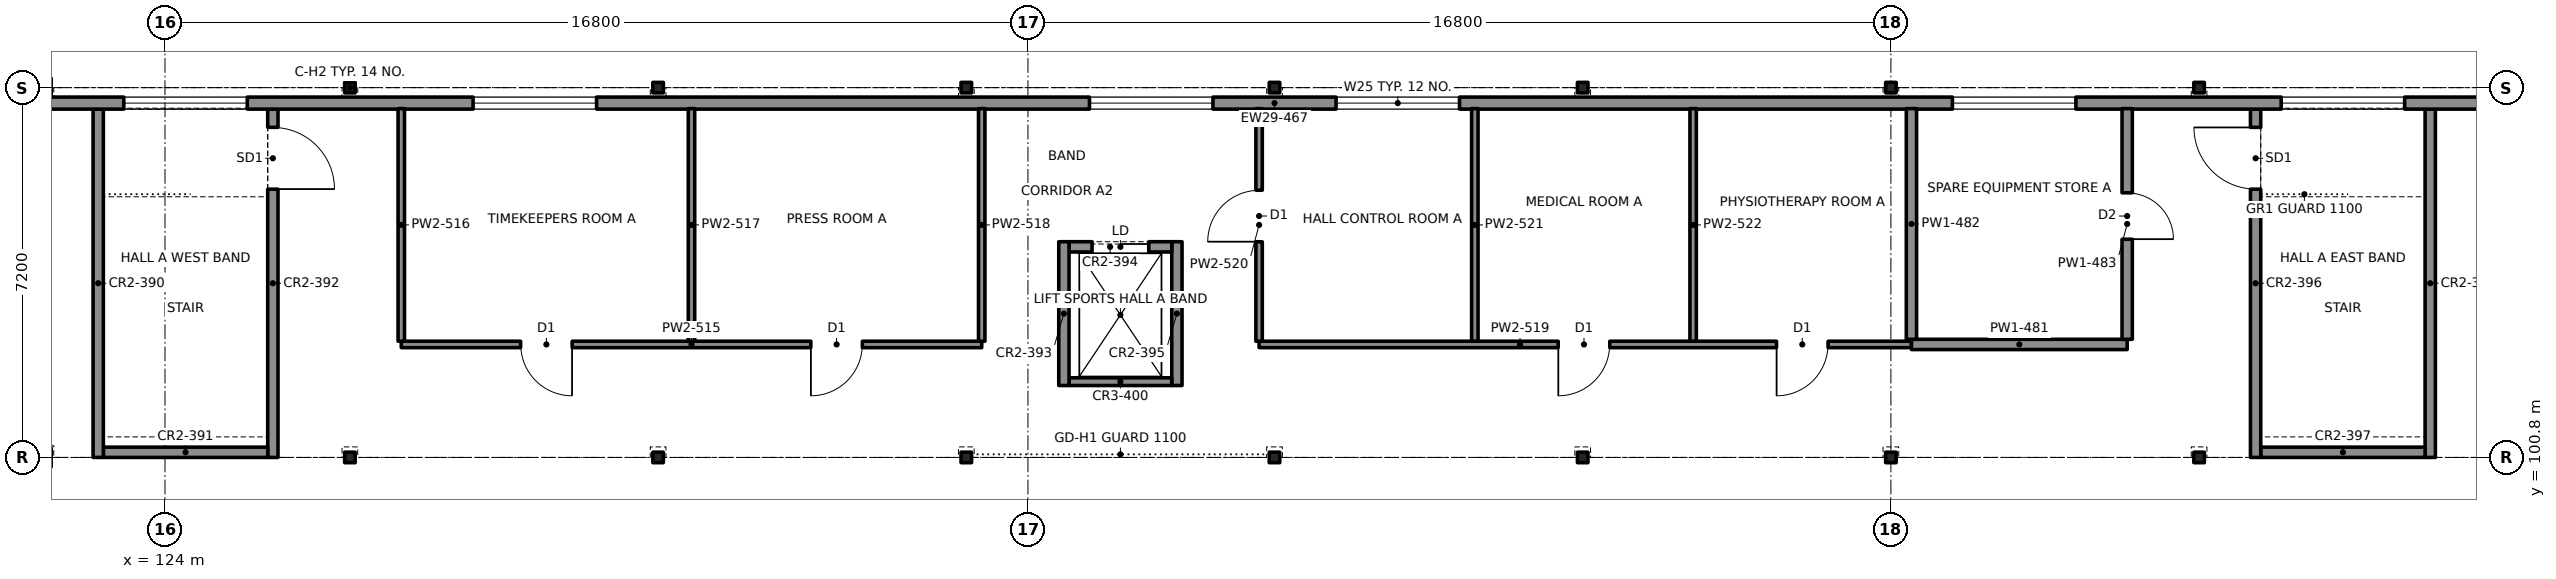
"""IFC4 building model, lengths in metres.
Left out: names, types, materials, properties, quantities, classifications, styles, units other than length and angle.
Written with IfcOpenShell. Run it as: python <this file> out.ifc"""

import sys

from ifc_helpers import new_model, si_unit, direction, frame, frame_2d, origin, origin_2d, place, context, subcontext, project, spatial, rectangle, i_section, extrude, element, fill, save


model = new_model("IFC4")
c1 = context("Model", 3, precision=1e-05, world=origin(), true_north=direction((0.0, 1.0)))
c2 = subcontext(c1, "Body", "Model", "MODEL_VIEW")
j1 = project(units=[si_unit("LENGTHUNIT", "METRE"), si_unit("PLANEANGLEUNIT", "RADIAN")], contexts=[c1])
p1 = place(None, origin())
s1 = spatial("IfcSite", under=j1, at=p1, CompositionType="ELEMENT")
p2 = place(p1, origin())
s2 = spatial("IfcBuilding", under=s1, at=p2, CompositionType="ELEMENT")
p3 = place(p2, frame((0.0, 0.0, 4.4)))
s3 = spatial("IfcBuildingStorey", under=s2, at=p3, CompositionType="ELEMENT", Elevation=4.4)
for number, where, z_axis, x_axis in (
    (1, (127.6, 100.8, 0.0), (0.0, 0.0, 1.0), (1.0, 0.0, 0.0)),
    (2, (127.6, 108.0, 0.0), (0.0, 0.0, 1.0), (1.0, 0.0, 0.0)),
    (3, (133.6, 100.8, 0.0), (0.0, 0.0, 1.0), (1.0, 0.0, 0.0)),
    (4, (133.6, 108.0, 0.0), (0.0, 0.0, 1.0), (1.0, 0.0, 0.0)),
    (5, (139.6, 100.8, 0.0), (0.0, 0.0, 1.0), (1.0, 0.0, 0.0)),
    (6, (139.6, 108.0, 0.0), (0.0, 0.0, 1.0), (1.0, 0.0, 0.0)),
    (7, (145.6, 100.8, 0.0), (0.0, 0.0, 1.0), (1.0, 0.0, 0.0)),
    (8, (145.6, 108.0, 0.0), (0.0, 0.0, 1.0), (1.0, 0.0, 0.0)),
    (9, (151.6, 100.8, 0.0), (0.0, 0.0, 1.0), (1.0, 0.0, 0.0)),
    (10, (151.6, 108.0, 0.0), (0.0, 0.0, 1.0), (1.0, 0.0, 0.0)),
    (11, (157.6, 100.8, 0.0), (0.0, 0.0, 1.0), (1.0, 0.0, 0.0)),
    (12, (157.6, 108.0, 0.0), (0.0, 0.0, 1.0), (1.0, 0.0, 0.0)),
    (13, (163.6, 100.8, 0.0), (0.0, 0.0, 1.0), (1.0, 0.0, 0.0)),
    (14, (163.6, 108.0, 0.0), (0.0, 0.0, 1.0), (1.0, 0.0, 0.0)),
):
    element("IfcColumn", number, at=place(p3, frame(where, z_axis=z_axis, x_axis=x_axis)), inside=s3, PredefinedType="COLUMN", context=c2, shape_type="SweptSolid", body=[
        extrude(i_section(OverallWidth=0.205, OverallDepth=0.31, WebThickness=0.01, FlangeThickness=0.016, at=origin_2d()), origin(), (0.0, 0.0, 1.0), 4.25),
    ])
p4 = place(p3, frame((120.4, 107.699, 0.0), z_axis=(0.0, 0.0, 1.0), x_axis=(1.0, 0.0, 0.0)))
e15 = element("IfcWall", 15, at=p4, inside=s3, PredefinedType="SOLIDWALL", context=c2, shape_type="SweptSolid", body=[
    extrude(rectangle(XDim=50.4, YDim=0.234, at=frame_2d((25.2, 0.0))), origin(), (0.0, 0.0, 1.0), 4.4),
])
p5 = place(p4, frame((2.8, 0.0, 1.0)))
e16 = element("IfcOpeningElement", 16, at=p5, cuts=e15, PredefinedType="OPENING", context=c2, shape_type="SweptSolid", body=[
    extrude(rectangle(XDim=2.4, YDim=2.4, at=frame_2d((1.2, 1.2))), frame((0.0, 0.127, 0.0), z_axis=(0.0, -1.0, 0.0), x_axis=(1.0, 0.0, 0.0)), (0.0, 0.0, 1.0), 0.254),
])
p6 = place(p4, frame((9.6, 0.0, 1.0)))
e17 = element("IfcOpeningElement", 17, at=p6, cuts=e15, PredefinedType="OPENING", context=c2, shape_type="SweptSolid", body=[
    extrude(rectangle(XDim=2.4, YDim=2.4, at=frame_2d((1.2, 1.2))), frame((0.0, 0.127, 0.0), z_axis=(0.0, -1.0, 0.0), x_axis=(1.0, 0.0, 0.0)), (0.0, 0.0, 1.0), 0.254),
])
p7 = place(p4, frame((21.6, 0.0, 1.0)))
e18 = element("IfcOpeningElement", 18, at=p7, cuts=e15, PredefinedType="OPENING", context=c2, shape_type="SweptSolid", body=[
    extrude(rectangle(XDim=2.4, YDim=2.4, at=frame_2d((1.2, 1.2))), frame((0.0, 0.127, 0.0), z_axis=(0.0, -1.0, 0.0), x_axis=(1.0, 0.0, 0.0)), (0.0, 0.0, 1.0), 0.254),
])
p8 = place(p4, frame((26.4, 0.0, 1.0)))
e19 = element("IfcOpeningElement", 19, at=p8, cuts=e15, PredefinedType="OPENING", context=c2, shape_type="SweptSolid", body=[
    extrude(rectangle(XDim=2.4, YDim=2.4, at=frame_2d((1.2, 1.2))), frame((0.0, 0.127, 0.0), z_axis=(0.0, -1.0, 0.0), x_axis=(1.0, 0.0, 0.0)), (0.0, 0.0, 1.0), 0.254),
])
p9 = place(p4, frame((38.4, 0.0, 1.0)))
e20 = element("IfcOpeningElement", 20, at=p9, cuts=e15, PredefinedType="OPENING", context=c2, shape_type="SweptSolid", body=[
    extrude(rectangle(XDim=2.4, YDim=2.4, at=frame_2d((1.2, 1.2))), frame((0.0, 0.127, 0.0), z_axis=(0.0, -1.0, 0.0), x_axis=(1.0, 0.0, 0.0)), (0.0, 0.0, 1.0), 0.254),
])
p10 = place(p4, frame((44.8, 0.0, 1.0)))
e21 = element("IfcOpeningElement", 21, at=p10, cuts=e15, PredefinedType="OPENING", context=c2, shape_type="SweptSolid", body=[
    extrude(rectangle(XDim=2.4, YDim=2.4, at=frame_2d((1.2, 1.2))), frame((0.0, 0.127, 0.0), z_axis=(0.0, -1.0, 0.0), x_axis=(1.0, 0.0, 0.0)), (0.0, 0.0, 1.0), 0.254),
])
p11 = place(p3, frame((164.7, 100.8, 0.0), z_axis=(0.0, 0.0, 1.0), x_axis=(0.0, 1.0, 0.0)))
e22 = element("IfcWall", 22, at=p11, inside=s3, PredefinedType="SOLIDWALL", context=c2, shape_type="SweptSolid", body=[
    extrude(rectangle(XDim=6.783, YDim=0.2, at=frame_2d((3.392, 0.0))), origin(), (0.0, 0.0, 1.0), 3.0),
])
p12 = place(p11, frame((5.225, 0.0, 0.0)))
e23 = element("IfcOpeningElement", 23, at=p12, cuts=e22, PredefinedType="OPENING", context=c2, shape_type="SweptSolid", body=[
    extrude(rectangle(XDim=1.2, YDim=2.1, at=frame_2d((0.6, 1.05))), frame((0.0, 0.11, 0.0), z_axis=(0.0, -1.0, 0.0), x_axis=(1.0, 0.0, 0.0)), (0.0, 0.0, 1.0), 0.22),
])
p13 = place(p3, frame((168.1, 100.8, 0.0), z_axis=(0.0, 0.0, 1.0), x_axis=(0.0, 1.0, 0.0)))
e24 = element("IfcWall", 24, at=p13, inside=s3, PredefinedType="SOLIDWALL", context=c2, shape_type="SweptSolid", body=[
    extrude(rectangle(XDim=6.783, YDim=0.2, at=frame_2d((3.392, 0.0))), origin(), (0.0, 0.0, 1.0), 3.0),
])
p14 = place(p3, frame((164.8, 100.9, 0.0), z_axis=(0.0, 0.0, 1.0), x_axis=(1.0, 0.0, 0.0)))
e25 = element("IfcWall", 25, at=p14, inside=s3, PredefinedType="SOLIDWALL", context=c2, shape_type="SweptSolid", body=[
    extrude(rectangle(XDim=3.2, YDim=0.2, at=frame_2d((1.6, 0.0))), origin(), (0.0, 0.0, 1.0), 3.0),
])
p15 = place(p3, frame((122.7, 100.8, 0.0), z_axis=(0.0, 0.0, 1.0), x_axis=(0.0, 1.0, 0.0)))
e26 = element("IfcWall", 26, at=p15, inside=s3, PredefinedType="SOLIDWALL", context=c2, shape_type="SweptSolid", body=[
    extrude(rectangle(XDim=6.783, YDim=0.2, at=frame_2d((3.392, 0.0))), origin(), (0.0, 0.0, 1.0), 3.0),
])
p16 = place(p3, frame((126.1, 100.8, 0.0), z_axis=(0.0, 0.0, 1.0), x_axis=(0.0, 1.0, 0.0)))
e27 = element("IfcWall", 27, at=p16, inside=s3, PredefinedType="SOLIDWALL", context=c2, shape_type="SweptSolid", body=[
    extrude(rectangle(XDim=6.783, YDim=0.2, at=frame_2d((3.392, 0.0))), origin(), (0.0, 0.0, 1.0), 3.0),
])
p17 = place(p16, frame((5.225, 0.0, 0.0)))
e28 = element("IfcOpeningElement", 28, at=p17, cuts=e27, PredefinedType="OPENING", context=c2, shape_type="SweptSolid", body=[
    extrude(rectangle(XDim=1.2, YDim=2.1, at=frame_2d((0.6, 1.05))), frame((0.0, 0.11, 0.0), z_axis=(0.0, -1.0, 0.0), x_axis=(1.0, 0.0, 0.0)), (0.0, 0.0, 1.0), 0.22),
])
p18 = place(p3, frame((122.8, 100.9, 0.0), z_axis=(0.0, 0.0, 1.0), x_axis=(1.0, 0.0, 0.0)))
e29 = element("IfcWall", 29, at=p18, inside=s3, PredefinedType="SOLIDWALL", context=c2, shape_type="SweptSolid", body=[
    extrude(rectangle(XDim=3.2, YDim=0.2, at=frame_2d((1.6, 0.0))), origin(), (0.0, 0.0, 1.0), 3.0),
])
for number, where, z_axis, x_axis in (
    (30, (141.5, 102.2, 0.0), (0.0, 0.0, 1.0), (0.0, 1.0, 0.0)),
    (31, (143.7, 102.2, 0.0), (0.0, 0.0, 1.0), (0.0, 1.0, 0.0)),
):
    element("IfcWall", number, at=place(p3, frame(where, z_axis=z_axis, x_axis=x_axis)), inside=s3, PredefinedType="SOLIDWALL", context=c2, shape_type="SweptSolid", body=[
        extrude(rectangle(XDim=2.8, YDim=0.2, at=frame_2d((1.4, 0.0))), origin(), (0.0, 0.0, 1.0), 3.6),
    ])
p19 = place(p3, frame((141.6, 102.275, 0.0), z_axis=(0.0, 0.0, 1.0), x_axis=(1.0, 0.0, 0.0)))
e32 = element("IfcWall", 32, at=p19, inside=s3, PredefinedType="SOLIDWALL", context=c2, shape_type="SweptSolid", body=[
    extrude(rectangle(XDim=2.0, YDim=0.15, at=frame_2d((1.0, 0.0))), origin(), (0.0, 0.0, 1.0), 3.6),
])
p20 = place(p3, frame((141.6, 104.9, 0.0), z_axis=(0.0, 0.0, 1.0), x_axis=(1.0, 0.0, 0.0)))
e33 = element("IfcWall", 33, at=p20, inside=s3, PredefinedType="SOLIDWALL", context=c2, shape_type="SweptSolid", body=[
    extrude(rectangle(XDim=2.0, YDim=0.2, at=frame_2d((1.0, 0.0))), origin(), (0.0, 0.0, 1.0), 3.6),
])
p21 = place(p20, frame((0.45, 0.0, 0.0)))
e34 = element("IfcOpeningElement", 34, at=p21, cuts=e33, PredefinedType="OPENING", context=c2, shape_type="SweptSolid", body=[
    extrude(rectangle(XDim=1.1, YDim=2.1, at=frame_2d((0.55, 1.05))), frame((0.0, 0.11, 0.0), z_axis=(0.0, -1.0, 0.0), x_axis=(1.0, 0.0, 0.0)), (0.0, 0.0, 1.0), 0.22),
])
p22 = place(p3, frame((128.6, 103.0, 0.0), z_axis=(0.0, 0.0, 1.0), x_axis=(1.0, 0.0, 0.0)))
e35 = element("IfcWall", 35, at=p22, inside=s3, PredefinedType="PARTITIONING", context=c2, shape_type="SweptSolid", body=[
    extrude(rectangle(XDim=11.3, YDim=0.125, at=frame_2d((5.65, 0.0))), origin(), (0.0, 0.0, 1.0), 3.65),
])
p23 = place(p22, frame((2.325, 0.0, 0.0)))
e36 = element("IfcOpeningElement", 36, at=p23, cuts=e35, PredefinedType="OPENING", context=c2, shape_type="SweptSolid", body=[
    extrude(rectangle(XDim=1.0, YDim=2.1, at=frame_2d((0.5, 1.05))), frame((0.0, 0.073, 0.0), z_axis=(0.0, -1.0, 0.0), x_axis=(1.0, 0.0, 0.0)), (0.0, 0.0, 1.0), 0.145),
])
p24 = place(p22, frame((7.975, 0.0, 0.0)))
e37 = element("IfcOpeningElement", 37, at=p24, cuts=e35, PredefinedType="OPENING", context=c2, shape_type="SweptSolid", body=[
    extrude(rectangle(XDim=1.0, YDim=2.1, at=frame_2d((0.5, 1.05))), frame((0.0, 0.073, 0.0), z_axis=(0.0, -1.0, 0.0), x_axis=(1.0, 0.0, 0.0)), (0.0, 0.0, 1.0), 0.145),
])
p25 = place(p3, frame((145.3, 103.0, 0.0), z_axis=(0.0, 0.0, 1.0), x_axis=(1.0, 0.0, 0.0)))
e38 = element("IfcWall", 38, at=p25, inside=s3, PredefinedType="PARTITIONING", context=c2, shape_type="SweptSolid", body=[
    extrude(rectangle(XDim=12.7, YDim=0.125, at=frame_2d((6.35, 0.0))), origin(), (0.0, 0.0, 1.0), 3.65),
])
p26 = place(p25, frame((5.825, 0.0, 0.0)))
e39 = element("IfcOpeningElement", 39, at=p26, cuts=e38, PredefinedType="OPENING", context=c2, shape_type="SweptSolid", body=[
    extrude(rectangle(XDim=1.0, YDim=2.1, at=frame_2d((0.5, 1.05))), frame((0.0, 0.073, 0.0), z_axis=(0.0, -1.0, 0.0), x_axis=(1.0, 0.0, 0.0)), (0.0, 0.0, 1.0), 0.145),
])
p27 = place(p25, frame((10.075, 0.0, 0.0)))
e40 = element("IfcOpeningElement", 40, at=p27, cuts=e38, PredefinedType="OPENING", context=c2, shape_type="SweptSolid", body=[
    extrude(rectangle(XDim=1.0, YDim=2.1, at=frame_2d((0.5, 1.05))), frame((0.0, 0.073, 0.0), z_axis=(0.0, -1.0, 0.0), x_axis=(1.0, 0.0, 0.0)), (0.0, 0.0, 1.0), 0.145),
])
p28 = place(p3, frame((158.0, 103.0, 0.0), z_axis=(0.0, 0.0, 1.0), x_axis=(1.0, 0.0, 0.0)))
e41 = element("IfcWall", 41, at=p28, inside=s3, PredefinedType="PARTITIONING", context=c2, shape_type="SweptSolid", body=[
    extrude(rectangle(XDim=4.2, YDim=0.2, at=frame_2d((2.1, 0.0))), origin(), (0.0, 0.0, 1.0), 3.65),
])
for number, where, z_axis, x_axis in (
    (42, (128.6, 103.062, 0.0), (0.0, 0.0, 1.0), (0.0, 1.0, 0.0)),
    (43, (134.25, 103.062, 0.0), (0.0, 0.0, 1.0), (0.0, 1.0, 0.0)),
    (44, (139.9, 103.062, 0.0), (0.0, 0.0, 1.0), (0.0, 1.0, 0.0)),
):
    element("IfcWall", number, at=place(p3, frame(where, z_axis=z_axis, x_axis=x_axis)), inside=s3, PredefinedType="PARTITIONING", context=c2, shape_type="SweptSolid", body=[
        extrude(rectangle(XDim=4.529, YDim=0.125, at=frame_2d((2.265, 0.0))), origin(), (0.0, 0.0, 1.0), 3.65),
    ])
p29 = place(p3, frame((145.3, 103.062, 0.0), z_axis=(0.0, 0.0, 1.0), x_axis=(0.0, 1.0, 0.0)))
e45 = element("IfcWall", 45, at=p29, inside=s3, PredefinedType="PARTITIONING", context=c2, shape_type="SweptSolid", body=[
    extrude(rectangle(XDim=4.529, YDim=0.125, at=frame_2d((2.265, 0.0))), origin(), (0.0, 0.0, 1.0), 3.65),
])
p30 = place(p29, frame((1.938, 0.0, 0.0)))
e46 = element("IfcOpeningElement", 46, at=p30, cuts=e45, PredefinedType="OPENING", context=c2, shape_type="SweptSolid", body=[
    extrude(rectangle(XDim=1.0, YDim=2.1, at=frame_2d((0.5, 1.05))), frame((0.0, 0.073, 0.0), z_axis=(0.0, -1.0, 0.0), x_axis=(1.0, 0.0, 0.0)), (0.0, 0.0, 1.0), 0.145),
])
for number, where, z_axis, x_axis in (
    (47, (149.5, 103.062, 0.0), (0.0, 0.0, 1.0), (0.0, 1.0, 0.0)),
    (48, (153.75, 103.062, 0.0), (0.0, 0.0, 1.0), (0.0, 1.0, 0.0)),
):
    element("IfcWall", number, at=place(p3, frame(where, z_axis=z_axis, x_axis=x_axis)), inside=s3, PredefinedType="PARTITIONING", context=c2, shape_type="SweptSolid", body=[
        extrude(rectangle(XDim=4.529, YDim=0.125, at=frame_2d((2.265, 0.0))), origin(), (0.0, 0.0, 1.0), 3.65),
    ])
p31 = place(p3, frame((158.0, 103.1, 0.0), z_axis=(0.0, 0.0, 1.0), x_axis=(0.0, 1.0, 0.0)))
e49 = element("IfcWall", 49, at=p31, inside=s3, PredefinedType="PARTITIONING", context=c2, shape_type="SweptSolid", body=[
    extrude(rectangle(XDim=4.491, YDim=0.2, at=frame_2d((2.246, 0.0))), origin(), (0.0, 0.0, 1.0), 3.65),
])
p32 = place(p3, frame((162.2, 103.1, 0.0), z_axis=(0.0, 0.0, 1.0), x_axis=(0.0, 1.0, 0.0)))
e50 = element("IfcWall", 50, at=p32, inside=s3, PredefinedType="PARTITIONING", context=c2, shape_type="SweptSolid", body=[
    extrude(rectangle(XDim=4.491, YDim=0.2, at=frame_2d((2.246, 0.0))), origin(), (0.0, 0.0, 1.0), 3.65),
])
p33 = place(p32, frame((1.95, 0.0, 0.0)))
e51 = element("IfcOpeningElement", 51, at=p33, cuts=e50, PredefinedType="OPENING", context=c2, shape_type="SweptSolid", body=[
    extrude(rectangle(XDim=0.9, YDim=2.1, at=frame_2d((0.45, 1.05))), frame((0.0, 0.11, 0.0), z_axis=(0.0, -1.0, 0.0), x_axis=(1.0, 0.0, 0.0)), (0.0, 0.0, 1.0), 0.22),
])
p34 = place(p5, origin())
e52 = element("IfcWindow", 52, at=p34, inside=s3, PartitioningType="SINGLE_PANEL", PredefinedType="WINDOW", context=c2, shape_type="SweptSolid", body=[
    extrude(rectangle(XDim=2.4, YDim=2.4, at=frame_2d((1.2, 1.2))), frame((0.0, 0.03, 0.0), z_axis=(0.0, -1.0, 0.0), x_axis=(1.0, 0.0, 0.0)), (0.0, 0.0, 1.0), 0.06),
])
fill(e16, e52)
p35 = place(p6, origin())
e53 = element("IfcWindow", 53, at=p35, inside=s3, PartitioningType="SINGLE_PANEL", PredefinedType="WINDOW", context=c2, shape_type="SweptSolid", body=[
    extrude(rectangle(XDim=2.4, YDim=2.4, at=frame_2d((1.2, 1.2))), frame((0.0, 0.03, 0.0), z_axis=(0.0, -1.0, 0.0), x_axis=(1.0, 0.0, 0.0)), (0.0, 0.0, 1.0), 0.06),
])
fill(e17, e53)
p36 = place(p7, origin())
e54 = element("IfcWindow", 54, at=p36, inside=s3, PartitioningType="SINGLE_PANEL", PredefinedType="WINDOW", context=c2, shape_type="SweptSolid", body=[
    extrude(rectangle(XDim=2.4, YDim=2.4, at=frame_2d((1.2, 1.2))), frame((0.0, 0.03, 0.0), z_axis=(0.0, -1.0, 0.0), x_axis=(1.0, 0.0, 0.0)), (0.0, 0.0, 1.0), 0.06),
])
fill(e18, e54)
p37 = place(p8, origin())
e55 = element("IfcWindow", 55, at=p37, inside=s3, PartitioningType="SINGLE_PANEL", PredefinedType="WINDOW", context=c2, shape_type="SweptSolid", body=[
    extrude(rectangle(XDim=2.4, YDim=2.4, at=frame_2d((1.2, 1.2))), frame((0.0, 0.03, 0.0), z_axis=(0.0, -1.0, 0.0), x_axis=(1.0, 0.0, 0.0)), (0.0, 0.0, 1.0), 0.06),
])
fill(e19, e55)
p38 = place(p9, origin())
e56 = element("IfcWindow", 56, at=p38, inside=s3, PartitioningType="SINGLE_PANEL", PredefinedType="WINDOW", context=c2, shape_type="SweptSolid", body=[
    extrude(rectangle(XDim=2.4, YDim=2.4, at=frame_2d((1.2, 1.2))), frame((0.0, 0.03, 0.0), z_axis=(0.0, -1.0, 0.0), x_axis=(1.0, 0.0, 0.0)), (0.0, 0.0, 1.0), 0.06),
])
fill(e20, e56)
p39 = place(p10, origin())
e57 = element("IfcWindow", 57, at=p39, inside=s3, PartitioningType="SINGLE_PANEL", PredefinedType="WINDOW", context=c2, shape_type="SweptSolid", body=[
    extrude(rectangle(XDim=2.4, YDim=2.4, at=frame_2d((1.2, 1.2))), frame((0.0, 0.03, 0.0), z_axis=(0.0, -1.0, 0.0), x_axis=(1.0, 0.0, 0.0)), (0.0, 0.0, 1.0), 0.06),
])
fill(e21, e57)
p40 = place(p12, origin())
e58 = element("IfcDoor", 58, at=p40, inside=s3, OperationType="SINGLE_SWING_RIGHT", PredefinedType="DOOR", context=c2, shape_type="SweptSolid", body=[
    extrude(rectangle(XDim=1.2, YDim=2.1, at=frame_2d((0.6, 1.05))), frame((0.0, 0.025, 0.0), z_axis=(0.0, -1.0, 0.0), x_axis=(1.0, 0.0, 0.0)), (0.0, 0.0, 1.0), 0.05),
])
fill(e23, e58)
p41 = place(p17, origin())
e59 = element("IfcDoor", 59, at=p41, inside=s3, OperationType="SINGLE_SWING_LEFT", PredefinedType="DOOR", context=c2, shape_type="SweptSolid", body=[
    extrude(rectangle(XDim=1.2, YDim=2.1, at=frame_2d((0.6, 1.05))), frame((0.0, 0.025, 0.0), z_axis=(0.0, -1.0, 0.0), x_axis=(1.0, 0.0, 0.0)), (0.0, 0.0, 1.0), 0.05),
])
fill(e28, e59)
p42 = place(p21, origin())
e60 = element("IfcDoor", 60, at=p42, inside=s3, OperationType="SLIDING_TO_LEFT", PredefinedType="DOOR", context=c2, shape_type="SweptSolid", body=[
    extrude(rectangle(XDim=1.1, YDim=2.1, at=frame_2d((0.55, 1.05))), frame((0.0, 0.025, 0.0), z_axis=(0.0, -1.0, 0.0), x_axis=(1.0, 0.0, 0.0)), (0.0, 0.0, 1.0), 0.05),
])
fill(e34, e60)
p43 = place(p23, origin())
e61 = element("IfcDoor", 61, at=p43, inside=s3, OperationType="SINGLE_SWING_RIGHT", PredefinedType="DOOR", context=c2, shape_type="SweptSolid", body=[
    extrude(rectangle(XDim=1.0, YDim=2.1, at=frame_2d((0.5, 1.05))), frame((0.0, 0.025, 0.0), z_axis=(0.0, -1.0, 0.0), x_axis=(1.0, 0.0, 0.0)), (0.0, 0.0, 1.0), 0.05),
])
fill(e36, e61)
p44 = place(p24, origin())
e62 = element("IfcDoor", 62, at=p44, inside=s3, OperationType="SINGLE_SWING_LEFT", PredefinedType="DOOR", context=c2, shape_type="SweptSolid", body=[
    extrude(rectangle(XDim=1.0, YDim=2.1, at=frame_2d((0.5, 1.05))), frame((0.0, 0.025, 0.0), z_axis=(0.0, -1.0, 0.0), x_axis=(1.0, 0.0, 0.0)), (0.0, 0.0, 1.0), 0.05),
])
fill(e37, e62)
p45 = place(p30, origin())
e63 = element("IfcDoor", 63, at=p45, inside=s3, OperationType="SINGLE_SWING_LEFT", PredefinedType="DOOR", context=c2, shape_type="SweptSolid", body=[
    extrude(rectangle(XDim=1.0, YDim=2.1, at=frame_2d((0.5, 1.05))), frame((0.0, 0.025, 0.0), z_axis=(0.0, -1.0, 0.0), x_axis=(1.0, 0.0, 0.0)), (0.0, 0.0, 1.0), 0.05),
])
fill(e46, e63)
p46 = place(p26, origin())
e64 = element("IfcDoor", 64, at=p46, inside=s3, OperationType="SINGLE_SWING_LEFT", PredefinedType="DOOR", context=c2, shape_type="SweptSolid", body=[
    extrude(rectangle(XDim=1.0, YDim=2.1, at=frame_2d((0.5, 1.05))), frame((0.0, 0.025, 0.0), z_axis=(0.0, -1.0, 0.0), x_axis=(1.0, 0.0, 0.0)), (0.0, 0.0, 1.0), 0.05),
])
fill(e39, e64)
p47 = place(p27, origin())
e65 = element("IfcDoor", 65, at=p47, inside=s3, OperationType="SINGLE_SWING_LEFT", PredefinedType="DOOR", context=c2, shape_type="SweptSolid", body=[
    extrude(rectangle(XDim=1.0, YDim=2.1, at=frame_2d((0.5, 1.05))), frame((0.0, 0.025, 0.0), z_axis=(0.0, -1.0, 0.0), x_axis=(1.0, 0.0, 0.0)), (0.0, 0.0, 1.0), 0.05),
])
fill(e40, e65)
p48 = place(p33, origin())
e66 = element("IfcDoor", 66, at=p48, inside=s3, OperationType="SINGLE_SWING_LEFT", PredefinedType="DOOR", context=c2, shape_type="SweptSolid", body=[
    extrude(rectangle(XDim=0.9, YDim=2.1, at=frame_2d((0.45, 1.05))), frame((0.0, 0.025, 0.0), z_axis=(0.0, -1.0, 0.0), x_axis=(1.0, 0.0, 0.0)), (0.0, 0.0, 1.0), 0.05),
])
fill(e51, e66)
save(model, sys.argv[1])
